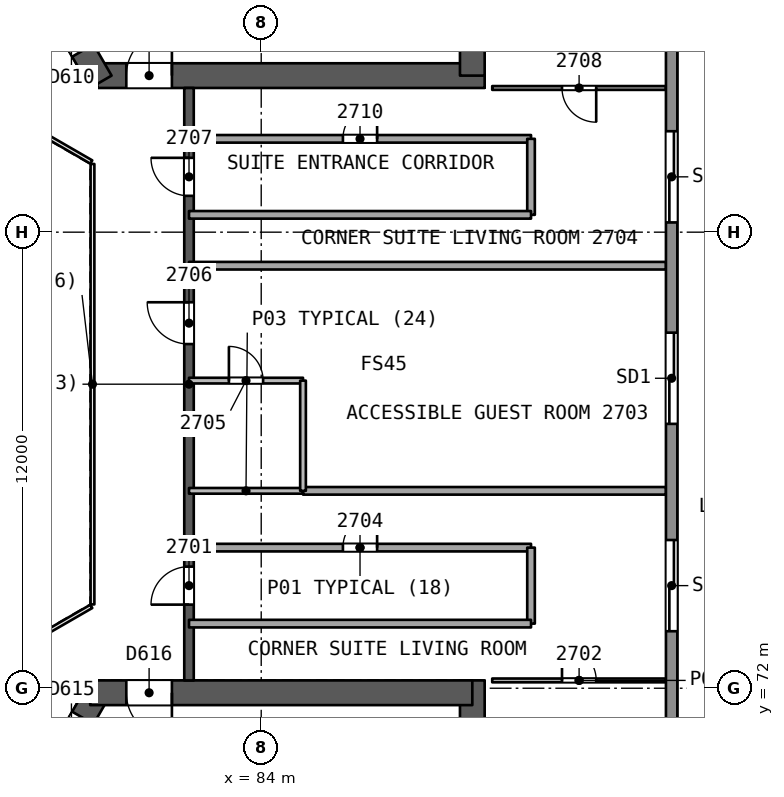
"""IFC4 building model, lengths in metres.
Left out: names, types, materials, properties, quantities, classifications, styles, units other than length and angle.
Written with IfcOpenShell. Run it as: python <this file> out.ifc"""

import sys

from ifc_helpers import new_model, si_unit, direction, frame, frame_2d, origin, place, context, subcontext, project, spatial, rectangle, extrude, element, fill, save


model = new_model("IFC4")
c1 = context("Model", 3, precision=1e-05, world=origin(), true_north=direction((0.0, 1.0)))
c2 = subcontext(c1, "Body", "Model", "MODEL_VIEW")
j1 = project(units=[si_unit("LENGTHUNIT", "METRE"), si_unit("PLANEANGLEUNIT", "RADIAN")], contexts=[c1])
p1 = place(None, origin())
s1 = spatial("IfcSite", under=j1, at=p1, CompositionType="ELEMENT")
p2 = place(p1, origin())
s2 = spatial("IfcBuilding", under=s1, at=p2, CompositionType="ELEMENT")
p3 = place(p2, frame((0.0, 0.0, 114.2)))
s3 = spatial("IfcBuildingStorey", under=s2, at=p3, CompositionType="ELEMENT", Elevation=114.2)
p4 = place(p3, frame((79.688, 88.119, 0.0), z_axis=(0.0, 0.0, 1.0), x_axis=(1.0, 0.0, 0.0)))
e1 = element("IfcWall", 1, at=p4, inside=s3, PredefinedType="SHEAR", context=c2, shape_type="SweptSolid", body=[
    extrude(rectangle(XDim=10.192, YDim=0.65, at=frame_2d((5.096, 0.0))), origin(), (0.0, 0.0, 1.0), 3.7),
])
p5 = place(p4, frame((0.762, 0.0, 0.0)))
e2 = element("IfcOpeningElement", 2, at=p5, cuts=e1, PredefinedType="OPENING", context=c2, shape_type="SweptSolid", body=[
    extrude(rectangle(XDim=1.2, YDim=2.1, at=frame_2d((0.6, 1.05))), frame((0.0, 0.335, 0.0), z_axis=(0.0, -1.0, 0.0), x_axis=(1.0, 0.0, 0.0)), (0.0, 0.0, 1.0), 0.671),
])
p6 = place(p3, frame((89.555, 88.119, 0.0), z_axis=(0.0, 0.0, 1.0), x_axis=(0.0, 1.0, 0.0)))
e3 = element("IfcWall", 3, at=p6, inside=s3, PredefinedType="SHEAR", context=c2, shape_type="SweptSolid", body=[
    extrude(rectangle(XDim=14.009, YDim=0.65, at=frame_2d((7.004, 0.0))), origin(), (0.0, 0.0, 1.0), 3.7),
])
p7 = place(p3, frame((74.754, 96.665, 0.0), z_axis=(0.0, 0.0, 1.0), x_axis=(0.500011799426, -0.866018591275, 0.0)))
e4 = element("IfcWall", 4, at=p7, inside=s3, PredefinedType="SHEAR", context=c2, shape_type="SweptSolid", body=[
    extrude(rectangle(XDim=10.055, YDim=0.65, at=frame_2d((5.027, 0.0))), origin(), (0.0, 0.0, 1.0), 3.7),
])
p8 = place(p7, frame((7.905, 0.0, 0.0)))
e5 = element("IfcOpeningElement", 5, at=p8, cuts=e4, PredefinedType="OPENING", context=c2, shape_type="SweptSolid", body=[
    extrude(rectangle(XDim=1.2, YDim=2.1, at=frame_2d((0.6, 1.05))), frame((0.0, 0.335, 0.0), z_axis=(0.0, -1.0, 0.0), x_axis=(1.0, 0.0, 0.0)), (0.0, 0.0, 1.0), 0.671),
])
p9 = place(p3, frame((79.688, 71.881, 0.0), z_axis=(0.0, 0.0, 1.0), x_axis=(-0.49999822179, -0.866026430432, 0.0)))
e6 = element("IfcWall", 6, at=p9, inside=s3, PredefinedType="SHEAR", context=c2, shape_type="SweptSolid", body=[
    extrude(rectangle(XDim=10.192, YDim=0.65, at=frame_2d((5.096, 0.0))), origin(), (0.0, 0.0, 1.0), 3.7),
])
p10 = place(p9, frame((0.762, 0.0, 0.0)))
e7 = element("IfcOpeningElement", 7, at=p10, cuts=e6, PredefinedType="OPENING", context=c2, shape_type="SweptSolid", body=[
    extrude(rectangle(XDim=1.2, YDim=2.1, at=frame_2d((0.6, 1.05))), frame((0.0, 0.335, 0.0), z_axis=(0.0, -1.0, 0.0), x_axis=(1.0, 0.0, 0.0)), (0.0, 0.0, 1.0), 0.671),
])
p11 = place(p3, frame((89.555, 58.06, 0.0), z_axis=(0.0, 0.0, 1.0), x_axis=(0.0, 1.0, 0.0)))
e8 = element("IfcWall", 8, at=p11, inside=s3, PredefinedType="SHEAR", context=c2, shape_type="SweptSolid", body=[
    extrude(rectangle(XDim=14.146, YDim=0.65, at=frame_2d((7.073, 0.0))), origin(), (0.0, 0.0, 1.0), 3.7),
])
p12 = place(p3, frame((89.555, 71.881, 0.0), z_axis=(0.0, 0.0, 1.0), x_axis=(-1.0, 0.0, 0.0)))
e9 = element("IfcWall", 9, at=p12, inside=s3, PredefinedType="SHEAR", context=c2, shape_type="SweptSolid", body=[
    extrude(rectangle(XDim=10.055, YDim=0.65, at=frame_2d((5.027, 0.0))), origin(), (0.0, 0.0, 1.0), 3.7),
])
p13 = place(p12, frame((7.905, 0.0, 0.0)))
e10 = element("IfcOpeningElement", 10, at=p13, cuts=e9, PredefinedType="OPENING", context=c2, shape_type="SweptSolid", body=[
    extrude(rectangle(XDim=1.2, YDim=2.1, at=frame_2d((0.6, 1.05))), frame((0.0, 0.335, 0.0), z_axis=(0.0, -1.0, 0.0), x_axis=(1.0, 0.0, 0.0)), (0.0, 0.0, 1.0), 0.671),
])
p14 = place(p3, frame((82.1, 72.206, 0.0), z_axis=(0.0, 0.0, 1.0), x_axis=(0.0, 1.0, 0.0)))
e11 = element("IfcWall", 11, at=p14, inside=s3, PredefinedType="SHEAR", context=c2, shape_type="SweptSolid", body=[
    extrude(rectangle(XDim=15.588, YDim=0.25, at=frame_2d((7.794, 0.0))), origin(), (0.0, 0.0, 1.0), 3.25),
])
p15 = place(p14, frame((1.994, 0.0, 0.0)))
e12 = element("IfcOpeningElement", 12, at=p15, cuts=e11, PredefinedType="OPENING", context=c2, shape_type="SweptSolid", body=[
    extrude(rectangle(XDim=1.0, YDim=2.1, at=frame_2d((0.5, 1.05))), frame((0.0, 0.135, 0.0), z_axis=(0.0, -1.0, 0.0), x_axis=(1.0, 0.0, 0.0)), (0.0, 0.0, 1.0), 0.271),
])
p16 = place(p14, frame((8.85, 0.0, 0.0)))
e13 = element("IfcOpeningElement", 13, at=p16, cuts=e11, PredefinedType="OPENING", context=c2, shape_type="SweptSolid", body=[
    extrude(rectangle(XDim=1.1, YDim=2.1, at=frame_2d((0.55, 1.05))), frame((0.0, 0.135, 0.0), z_axis=(0.0, -1.0, 0.0), x_axis=(1.0, 0.0, 0.0)), (0.0, 0.0, 1.0), 0.271),
])
p17 = place(p14, frame((12.75, 0.0, 0.0)))
e14 = element("IfcOpeningElement", 14, at=p17, cuts=e11, PredefinedType="OPENING", context=c2, shape_type="SweptSolid", body=[
    extrude(rectangle(XDim=1.0, YDim=2.1, at=frame_2d((0.5, 1.05))), frame((0.0, 0.135, 0.0), z_axis=(0.0, -1.0, 0.0), x_axis=(1.0, 0.0, 0.0)), (0.0, 0.0, 1.0), 0.271),
])
p18 = place(p3, frame((90.079, 72.206, 0.0), z_axis=(0.0, 0.0, 1.0), x_axis=(1.0, 0.0, 0.0)))
e15 = element("IfcWall", 15, at=p18, inside=s3, PredefinedType="PARTITIONING", context=c2, shape_type="SweptSolid", body=[
    extrude(rectangle(XDim=4.572, YDim=0.1, at=frame_2d((2.286, 0.0))), origin(), (0.0, 0.0, 1.0), 3.25),
])
p19 = place(p18, frame((1.836, 0.0, 0.0)))
e16 = element("IfcOpeningElement", 16, at=p19, cuts=e15, PredefinedType="OPENING", context=c2, shape_type="SweptSolid", body=[
    extrude(rectangle(XDim=0.9, YDim=2.1, at=frame_2d((0.45, 1.05))), frame((0.0, 0.061, 0.0), z_axis=(0.0, -1.0, 0.0), x_axis=(1.0, 0.0, 0.0)), (0.0, 0.0, 1.0), 0.121),
])
p20 = place(p3, frame((82.1, 75.7, 0.0), z_axis=(0.0, 0.0, 1.0), x_axis=(1.0, 0.0, 0.0)))
e17 = element("IfcWall", 17, at=p20, inside=s3, PredefinedType="PARTITIONING", context=c2, shape_type="SweptSolid", body=[
    extrude(rectangle(XDim=9.0, YDim=0.2, at=frame_2d((4.5, 0.0))), origin(), (0.0, 0.0, 1.0), 3.25),
])
p21 = place(p20, frame((4.05, 0.0, 0.0)))
e18 = element("IfcOpeningElement", 18, at=p21, cuts=e17, PredefinedType="OPENING", context=c2, shape_type="SweptSolid", body=[
    extrude(rectangle(XDim=0.9, YDim=2.1, at=frame_2d((0.45, 1.05))), frame((0.0, 0.11, 0.0), z_axis=(0.0, -1.0, 0.0), x_axis=(1.0, 0.0, 0.0)), (0.0, 0.0, 1.0), 0.221),
])
p22 = place(p3, frame((91.1, 75.7, 0.0), z_axis=(0.0, 0.0, 1.0), x_axis=(0.0, -1.0, 0.0)))
e19 = element("IfcWall", 19, at=p22, inside=s3, PredefinedType="PARTITIONING", context=c2, shape_type="SweptSolid", body=[
    extrude(rectangle(XDim=2.0, YDim=0.2, at=frame_2d((1.0, 0.0))), origin(), (0.0, 0.0, 1.0), 3.25),
])
p23 = place(p3, frame((91.1, 73.7, 0.0), z_axis=(0.0, 0.0, 1.0), x_axis=(-1.0, 0.0, 0.0)))
e20 = element("IfcWall", 20, at=p23, inside=s3, PredefinedType="PARTITIONING", context=c2, shape_type="SweptSolid", body=[
    extrude(rectangle(XDim=9.0, YDim=0.2, at=frame_2d((4.5, 0.0))), origin(), (0.0, 0.0, 1.0), 3.25),
])
p24 = place(p3, frame((94.651, 77.194, 0.0), z_axis=(0.0, 0.0, 1.0), x_axis=(-1.0, 0.0, 0.0)))
e21 = element("IfcWall", 21, at=p24, inside=s3, PredefinedType="PARTITIONING", context=c2, shape_type="SweptSolid", body=[
    extrude(rectangle(XDim=9.551, YDim=0.2, at=frame_2d((4.775, 0.0))), origin(), (0.0, 0.0, 1.0), 3.25),
])
p25 = place(p3, frame((85.1, 77.194, 0.0), z_axis=(0.0, 0.0, 1.0), x_axis=(-1.0, 0.0, 0.0)))
e22 = element("IfcWall", 22, at=p25, inside=s3, PredefinedType="PARTITIONING", context=c2, shape_type="SweptSolid", body=[
    extrude(rectangle(XDim=3.0, YDim=0.15, at=frame_2d((1.5, 0.0))), origin(), (0.0, 0.0, 1.0), 3.25),
])
p26 = place(p3, frame((82.1, 80.094, 0.0), z_axis=(0.0, 0.0, 1.0), x_axis=(1.0, 0.0, 0.0)))
e23 = element("IfcWall", 23, at=p26, inside=s3, PredefinedType="PARTITIONING", context=c2, shape_type="SweptSolid", body=[
    extrude(rectangle(XDim=3.0, YDim=0.15, at=frame_2d((1.5, 0.0))), origin(), (0.0, 0.0, 1.0), 3.25),
])
p27 = place(p26, frame((1.05, 0.0, 0.0)))
e24 = element("IfcOpeningElement", 24, at=p27, cuts=e23, PredefinedType="OPENING", context=c2, shape_type="SweptSolid", body=[
    extrude(rectangle(XDim=0.9, YDim=2.1, at=frame_2d((0.45, 1.05))), frame((0.0, 0.085, 0.0), z_axis=(0.0, -1.0, 0.0), x_axis=(1.0, 0.0, 0.0)), (0.0, 0.0, 1.0), 0.171),
])
p28 = place(p3, frame((85.1, 80.094, 0.0), z_axis=(0.0, 0.0, 1.0), x_axis=(0.0, -1.0, 0.0)))
e25 = element("IfcWall", 25, at=p28, inside=s3, PredefinedType="PARTITIONING", context=c2, shape_type="SweptSolid", body=[
    extrude(rectangle(XDim=2.9, YDim=0.15, at=frame_2d((1.45, 0.0))), origin(), (0.0, 0.0, 1.0), 3.25),
])
p29 = place(p3, frame((94.651, 83.118, 0.0), z_axis=(0.0, 0.0, 1.0), x_axis=(-1.0, 0.0, 0.0)))
e26 = element("IfcWall", 26, at=p29, inside=s3, PredefinedType="PARTITIONING", context=c2, shape_type="SweptSolid", body=[
    extrude(rectangle(XDim=12.551, YDim=0.2, at=frame_2d((6.275, 0.0))), origin(), (0.0, 0.0, 1.0), 3.25),
])
p30 = place(p3, frame((94.651, 87.794, 0.0), z_axis=(0.0, 0.0, 1.0), x_axis=(-1.0, 0.0, 0.0)))
e27 = element("IfcWall", 27, at=p30, inside=s3, PredefinedType="PARTITIONING", context=c2, shape_type="SweptSolid", body=[
    extrude(rectangle(XDim=4.572, YDim=0.1, at=frame_2d((2.286, 0.0))), origin(), (0.0, 0.0, 1.0), 3.25),
])
p31 = place(p30, frame((1.836, 0.0, 0.0)))
e28 = element("IfcOpeningElement", 28, at=p31, cuts=e27, PredefinedType="OPENING", context=c2, shape_type="SweptSolid", body=[
    extrude(rectangle(XDim=0.9, YDim=2.1, at=frame_2d((0.45, 1.05))), frame((0.0, 0.061, 0.0), z_axis=(0.0, -1.0, 0.0), x_axis=(1.0, 0.0, 0.0)), (0.0, 0.0, 1.0), 0.121),
])
p32 = place(p3, frame((82.1, 86.456, 0.0), z_axis=(0.0, 0.0, 1.0), x_axis=(1.0, 0.0, 0.0)))
e29 = element("IfcWall", 29, at=p32, inside=s3, PredefinedType="PARTITIONING", context=c2, shape_type="SweptSolid", body=[
    extrude(rectangle(XDim=9.0, YDim=0.2, at=frame_2d((4.5, 0.0))), origin(), (0.0, 0.0, 1.0), 3.25),
])
p33 = place(p32, frame((4.05, 0.0, 0.0)))
e30 = element("IfcOpeningElement", 30, at=p33, cuts=e29, PredefinedType="OPENING", context=c2, shape_type="SweptSolid", body=[
    extrude(rectangle(XDim=0.9, YDim=2.1, at=frame_2d((0.45, 1.05))), frame((0.0, 0.11, 0.0), z_axis=(0.0, -1.0, 0.0), x_axis=(1.0, 0.0, 0.0)), (0.0, 0.0, 1.0), 0.221),
])
p34 = place(p3, frame((91.1, 86.456, 0.0), z_axis=(0.0, 0.0, 1.0), x_axis=(0.0, -1.0, 0.0)))
e31 = element("IfcWall", 31, at=p34, inside=s3, PredefinedType="PARTITIONING", context=c2, shape_type="SweptSolid", body=[
    extrude(rectangle(XDim=2.0, YDim=0.2, at=frame_2d((1.0, 0.0))), origin(), (0.0, 0.0, 1.0), 3.25),
])
p35 = place(p3, frame((91.1, 84.456, 0.0), z_axis=(0.0, 0.0, 1.0), x_axis=(-1.0, 0.0, 0.0)))
e32 = element("IfcWall", 32, at=p35, inside=s3, PredefinedType="PARTITIONING", context=c2, shape_type="SweptSolid", body=[
    extrude(rectangle(XDim=9.0, YDim=0.2, at=frame_2d((4.5, 0.0))), origin(), (0.0, 0.0, 1.0), 3.25),
])
p36 = place(p3, frame((94.8, 108.469, 0.0), z_axis=(0.0, 0.0, 1.0), x_axis=(0.0, -1.0, 0.0)))
e33 = element("IfcWall", 33, at=p36, inside=s3, PredefinedType="SOLIDWALL", context=c2, shape_type="SweptSolid", body=[
    extrude(rectangle(XDim=56.938, YDim=0.3, at=frame_2d((28.469, 0.0))), origin(), (0.0, 0.0, 1.0), 3.25),
])
p37 = place(p36, frame((27.113, 0.0, 0.0)))
e34 = element("IfcOpeningElement", 34, at=p37, cuts=e33, PredefinedType="OPENING", context=c2, shape_type="SweptSolid", body=[
    extrude(rectangle(XDim=2.4, YDim=2.4, at=frame_2d((1.2, 1.2))), frame((0.0, 0.161, 0.0), z_axis=(0.0, -1.0, 0.0), x_axis=(1.0, 0.0, 0.0)), (0.0, 0.0, 1.0), 0.321),
])
p38 = place(p36, frame((32.569, 0.0, 0.0)))
e35 = element("IfcOpeningElement", 35, at=p38, cuts=e33, PredefinedType="OPENING", context=c2, shape_type="SweptSolid", body=[
    extrude(rectangle(XDim=2.4, YDim=2.4, at=frame_2d((1.2, 1.2))), frame((0.0, 0.161, 0.0), z_axis=(0.0, -1.0, 0.0), x_axis=(1.0, 0.0, 0.0)), (0.0, 0.0, 1.0), 0.321),
])
p39 = place(p36, frame((44.202, 0.0, 0.0)))
e36 = element("IfcOpeningElement", 36, at=p39, cuts=e33, PredefinedType="OPENING", context=c2, shape_type="SweptSolid", body=[
    extrude(rectangle(XDim=2.4, YDim=2.4, at=frame_2d((1.2, 1.2))), frame((0.0, 0.161, 0.0), z_axis=(0.0, -1.0, 0.0), x_axis=(1.0, 0.0, 0.0)), (0.0, 0.0, 1.0), 0.321),
])
p40 = place(p36, frame((21.813, 0.0, 0.0)))
e37 = element("IfcOpeningElement", 37, at=p40, cuts=e33, PredefinedType="OPENING", context=c2, shape_type="SweptSolid", body=[
    extrude(rectangle(XDim=2.4, YDim=2.4, at=frame_2d((1.2, 1.2))), frame((0.0, 0.161, 0.0), z_axis=(0.0, -1.0, 0.0), x_axis=(1.0, 0.0, 0.0)), (0.0, 0.0, 1.0), 0.321),
])
p41 = place(p36, frame((10.366, 0.0, 0.0)))
e38 = element("IfcOpeningElement", 38, at=p41, cuts=e33, PredefinedType="OPENING", context=c2, shape_type="SweptSolid", body=[
    extrude(rectangle(XDim=2.4, YDim=2.4, at=frame_2d((1.2, 1.2))), frame((0.0, 0.161, 0.0), z_axis=(0.0, -1.0, 0.0), x_axis=(1.0, 0.0, 0.0)), (0.0, 0.0, 1.0), 0.321),
])
p42 = place(p3, frame((40.445, 82.913, 0.0), z_axis=(0.0, 0.0, 1.0), x_axis=(0.866025424614, 0.499999963922, 0.0)))
e39 = element("IfcWall", 39, at=p42, inside=s3, PredefinedType="SOLIDWALL", context=c2, shape_type="SweptSolid", body=[
    extrude(rectangle(XDim=56.938, YDim=0.3, at=frame_2d((28.469, 0.0))), origin(), (0.0, 0.0, 1.0), 3.25),
])
p43 = place(p42, frame((27.892, 0.0, 0.0)))
e40 = element("IfcOpeningElement", 40, at=p43, cuts=e39, PredefinedType="OPENING", context=c2, shape_type="SweptSolid", body=[
    extrude(rectangle(XDim=2.4, YDim=2.4, at=frame_2d((1.2, 1.2))), frame((0.0, 0.161, 0.0), z_axis=(0.0, -1.0, 0.0), x_axis=(1.0, 0.0, 0.0)), (0.0, 0.0, 1.0), 0.321),
])
p44 = place(p42, frame((43.417, 0.0, 0.0)))
e41 = element("IfcOpeningElement", 41, at=p44, cuts=e39, PredefinedType="OPENING", context=c2, shape_type="SweptSolid", body=[
    extrude(rectangle(XDim=2.4, YDim=2.4, at=frame_2d((1.2, 1.2))), frame((0.0, 0.161, 0.0), z_axis=(0.0, -1.0, 0.0), x_axis=(1.0, 0.0, 0.0)), (0.0, 0.0, 1.0), 0.321),
])
p45 = place(p42, frame((11.744, 0.0, 0.0)))
e42 = element("IfcOpeningElement", 42, at=p45, cuts=e39, PredefinedType="OPENING", context=c2, shape_type="SweptSolid", body=[
    extrude(rectangle(XDim=2.4, YDim=2.4, at=frame_2d((1.2, 1.2))), frame((0.0, 0.161, 0.0), z_axis=(0.0, -1.0, 0.0), x_axis=(1.0, 0.0, 0.0)), (0.0, 0.0, 1.0), 0.321),
])
p46 = place(p3, frame((89.755, 48.618, 0.0), z_axis=(0.0, 0.0, 1.0), x_axis=(-0.866025424614, 0.499999963922, 0.0)))
e43 = element("IfcWall", 43, at=p46, inside=s3, PredefinedType="SOLIDWALL", context=c2, shape_type="SweptSolid", body=[
    extrude(rectangle(XDim=56.938, YDim=0.3, at=frame_2d((28.469, 0.0))), origin(), (0.0, 0.0, 1.0), 3.25),
])
p47 = place(p46, frame((32.569, 0.0, 0.0)))
e44 = element("IfcOpeningElement", 44, at=p47, cuts=e43, PredefinedType="OPENING", context=c2, shape_type="SweptSolid", body=[
    extrude(rectangle(XDim=2.4, YDim=2.4, at=frame_2d((1.2, 1.2))), frame((0.0, 0.161, 0.0), z_axis=(0.0, -1.0, 0.0), x_axis=(1.0, 0.0, 0.0)), (0.0, 0.0, 1.0), 0.321),
])
p48 = place(p46, frame((44.202, 0.0, 0.0)))
e45 = element("IfcOpeningElement", 45, at=p48, cuts=e43, PredefinedType="OPENING", context=c2, shape_type="SweptSolid", body=[
    extrude(rectangle(XDim=2.4, YDim=2.4, at=frame_2d((1.2, 1.2))), frame((0.0, 0.161, 0.0), z_axis=(0.0, -1.0, 0.0), x_axis=(1.0, 0.0, 0.0)), (0.0, 0.0, 1.0), 0.321),
])
p49 = place(p46, frame((11.12, 0.0, 0.0)))
e46 = element("IfcOpeningElement", 46, at=p49, cuts=e43, PredefinedType="OPENING", context=c2, shape_type="SweptSolid", body=[
    extrude(rectangle(XDim=2.4, YDim=2.4, at=frame_2d((1.2, 1.2))), frame((0.0, 0.161, 0.0), z_axis=(0.0, -1.0, 0.0), x_axis=(1.0, 0.0, 0.0)), (0.0, 0.0, 1.0), 0.321),
])
p50 = place(p46, frame((26.801, 0.0, 0.0)))
e47 = element("IfcOpeningElement", 47, at=p50, cuts=e43, PredefinedType="OPENING", context=c2, shape_type="SweptSolid", body=[
    extrude(rectangle(XDim=2.4, YDim=2.4, at=frame_2d((1.2, 1.2))), frame((0.0, 0.161, 0.0), z_axis=(0.0, -1.0, 0.0), x_axis=(1.0, 0.0, 0.0)), (0.0, 0.0, 1.0), 0.321),
])
p51 = place(p3, frame((79.56, 74.206, 0.0), z_axis=(0.0, 0.0, 1.0), x_axis=(0.0, 1.0, 0.0)))
e48 = element("IfcWall", 48, at=p51, inside=s3, PredefinedType="PARTITIONING", context=c2, shape_type="SweptSolid", body=[
    extrude(rectangle(XDim=11.588, YDim=0.1, at=frame_2d((5.794, 0.0))), origin(), (0.0, 0.0, 1.0), 3.25),
])
for number, where, z_axis, x_axis in (
    (49, (79.53, 85.846, 0.0), (0.0, 0.0, 1.0), (-0.866, 0.5, 0.0)),
    (50, (77.798, 73.154, 0.0), (0.0, 0.0, 1.0), (0.866, 0.5, 0.0)),
):
    element("IfcWall", number, at=place(p3, frame(where, z_axis=z_axis, x_axis=x_axis)), inside=s3, PredefinedType="PARTITIONING", context=c2, shape_type="SweptSolid", body=[
        extrude(rectangle(XDim=2.0, YDim=0.1, at=frame_2d((1.0, 0.0))), origin(), (0.0, 0.0, 1.0), 3.25),
    ])
p52 = place(p15, origin())
e51 = element("IfcDoor", 51, at=p52, inside=s3, OperationType="SINGLE_SWING_LEFT", PredefinedType="NOTDEFINED", context=c2, shape_type="SweptSolid", body=[
    extrude(rectangle(XDim=1.0, YDim=2.1, at=frame_2d((0.5, 1.05))), frame((0.0, 0.025, 0.0), z_axis=(0.0, -1.0, 0.0), x_axis=(1.0, 0.0, 0.0)), (0.0, 0.0, 1.0), 0.05),
])
fill(e12, e51)
p53 = place(p19, origin())
e52 = element("IfcDoor", 52, at=p53, inside=s3, OperationType="SINGLE_SWING_LEFT", PredefinedType="NOTDEFINED", context=c2, shape_type="SweptSolid", body=[
    extrude(rectangle(XDim=0.9, YDim=2.1, at=frame_2d((0.45, 1.05))), frame((0.0, 0.025, 0.0), z_axis=(0.0, -1.0, 0.0), x_axis=(1.0, 0.0, 0.0)), (0.0, 0.0, 1.0), 0.05),
])
fill(e16, e52)
p54 = place(p21, origin())
e53 = element("IfcDoor", 53, at=p54, inside=s3, OperationType="SINGLE_SWING_RIGHT", PredefinedType="NOTDEFINED", context=c2, shape_type="SweptSolid", body=[
    extrude(rectangle(XDim=0.9, YDim=2.1, at=frame_2d((0.45, 1.05))), frame((0.0, 0.025, 0.0), z_axis=(0.0, -1.0, 0.0), x_axis=(1.0, 0.0, 0.0)), (0.0, 0.0, 1.0), 0.05),
])
fill(e18, e53)
p55 = place(p27, origin())
e54 = element("IfcDoor", 54, at=p55, inside=s3, OperationType="SINGLE_SWING_LEFT", PredefinedType="NOTDEFINED", context=c2, shape_type="SweptSolid", body=[
    extrude(rectangle(XDim=0.9, YDim=2.1, at=frame_2d((0.45, 1.05))), frame((0.0, 0.025, 0.0), z_axis=(0.0, -1.0, 0.0), x_axis=(1.0, 0.0, 0.0)), (0.0, 0.0, 1.0), 0.05),
])
fill(e24, e54)
p56 = place(p16, origin())
e55 = element("IfcDoor", 55, at=p56, inside=s3, OperationType="SINGLE_SWING_RIGHT", PredefinedType="NOTDEFINED", context=c2, shape_type="SweptSolid", body=[
    extrude(rectangle(XDim=1.1, YDim=2.1, at=frame_2d((0.55, 1.05))), frame((0.0, 0.025, 0.0), z_axis=(0.0, -1.0, 0.0), x_axis=(1.0, 0.0, 0.0)), (0.0, 0.0, 1.0), 0.05),
])
fill(e13, e55)
p57 = place(p17, origin())
e56 = element("IfcDoor", 56, at=p57, inside=s3, OperationType="SINGLE_SWING_RIGHT", PredefinedType="NOTDEFINED", context=c2, shape_type="SweptSolid", body=[
    extrude(rectangle(XDim=1.0, YDim=2.1, at=frame_2d((0.5, 1.05))), frame((0.0, 0.025, 0.0), z_axis=(0.0, -1.0, 0.0), x_axis=(1.0, 0.0, 0.0)), (0.0, 0.0, 1.0), 0.05),
])
fill(e14, e56)
p58 = place(p31, origin())
e57 = element("IfcDoor", 57, at=p58, inside=s3, OperationType="SINGLE_SWING_LEFT", PredefinedType="NOTDEFINED", context=c2, shape_type="SweptSolid", body=[
    extrude(rectangle(XDim=0.9, YDim=2.1, at=frame_2d((0.45, 1.05))), frame((0.0, 0.025, 0.0), z_axis=(0.0, -1.0, 0.0), x_axis=(1.0, 0.0, 0.0)), (0.0, 0.0, 1.0), 0.05),
])
fill(e28, e57)
p59 = place(p33, origin())
e58 = element("IfcDoor", 58, at=p59, inside=s3, OperationType="SINGLE_SWING_RIGHT", PredefinedType="NOTDEFINED", context=c2, shape_type="SweptSolid", body=[
    extrude(rectangle(XDim=0.9, YDim=2.1, at=frame_2d((0.45, 1.05))), frame((0.0, 0.025, 0.0), z_axis=(0.0, -1.0, 0.0), x_axis=(1.0, 0.0, 0.0)), (0.0, 0.0, 1.0), 0.05),
])
fill(e30, e58)
p60 = place(p37, origin())
e59 = element("IfcDoor", 59, at=p60, inside=s3, OperationType="SLIDING_TO_LEFT", PredefinedType="NOTDEFINED", context=c2, shape_type="SweptSolid", body=[
    extrude(rectangle(XDim=2.4, YDim=2.4, at=frame_2d((1.2, 1.2))), frame((0.0, 0.025, 0.0), z_axis=(0.0, -1.0, 0.0), x_axis=(1.0, 0.0, 0.0)), (0.0, 0.0, 1.0), 0.05),
])
fill(e34, e59)
p61 = place(p38, origin())
e60 = element("IfcDoor", 60, at=p61, inside=s3, OperationType="SLIDING_TO_RIGHT", PredefinedType="NOTDEFINED", context=c2, shape_type="SweptSolid", body=[
    extrude(rectangle(XDim=2.4, YDim=2.4, at=frame_2d((1.2, 1.2))), frame((0.0, 0.025, 0.0), z_axis=(0.0, -1.0, 0.0), x_axis=(1.0, 0.0, 0.0)), (0.0, 0.0, 1.0), 0.05),
])
fill(e35, e60)
p62 = place(p40, origin())
e61 = element("IfcDoor", 61, at=p62, inside=s3, OperationType="SLIDING_TO_RIGHT", PredefinedType="NOTDEFINED", context=c2, shape_type="SweptSolid", body=[
    extrude(rectangle(XDim=2.4, YDim=2.4, at=frame_2d((1.2, 1.2))), frame((0.0, 0.025, 0.0), z_axis=(0.0, -1.0, 0.0), x_axis=(1.0, 0.0, 0.0)), (0.0, 0.0, 1.0), 0.05),
])
fill(e37, e61)
p63 = place(p5, origin())
e62 = element("IfcDoor", 62, at=p63, inside=s3, OperationType="SINGLE_SWING_RIGHT", PredefinedType="NOTDEFINED", context=c2, shape_type="SweptSolid", body=[
    extrude(rectangle(XDim=1.2, YDim=2.1, at=frame_2d((0.6, 1.05))), frame((0.0, 0.025, 0.0), z_axis=(0.0, -1.0, 0.0), x_axis=(1.0, 0.0, 0.0)), (0.0, 0.0, 1.0), 0.05),
])
fill(e2, e62)
p64 = place(p13, origin())
e63 = element("IfcDoor", 63, at=p64, inside=s3, OperationType="SINGLE_SWING_LEFT", PredefinedType="NOTDEFINED", context=c2, shape_type="SweptSolid", body=[
    extrude(rectangle(XDim=1.2, YDim=2.1, at=frame_2d((0.6, 1.05))), frame((0.0, 0.025, 0.0), z_axis=(0.0, -1.0, 0.0), x_axis=(1.0, 0.0, 0.0)), (0.0, 0.0, 1.0), 0.05),
])
fill(e10, e63)
save(model, sys.argv[1])
